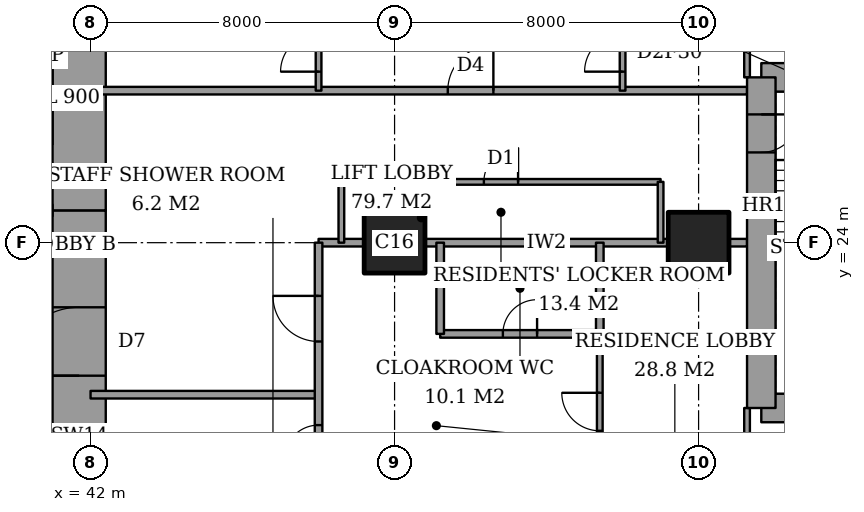
"""IFC4 building model, lengths in metres.
Left out: names, types, materials, properties, quantities, classifications, styles, units other than length and angle.
Written with IfcOpenShell. Run it as: python <this file> out.ifc"""

import sys

from ifc_helpers import new_model, si_unit, direction, frame, frame_2d, origin, origin_2d, place, context, subcontext, project, spatial, rectangle, extrude, element, fill, save


model = new_model("IFC4")
c1 = context("Model", 3, precision=1e-05, world=origin(), true_north=direction((0.0, 1.0)))
c2 = subcontext(c1, "Body", "Model", "MODEL_VIEW")
j1 = project(units=[si_unit("LENGTHUNIT", "METRE"), si_unit("PLANEANGLEUNIT", "RADIAN")], contexts=[c1])
p1 = place(None, origin())
s1 = spatial("IfcSite", under=j1, at=p1, CompositionType="ELEMENT")
p2 = place(p1, origin())
s2 = spatial("IfcBuilding", under=s1, at=p2, CompositionType="ELEMENT")
p3 = place(p2, frame((0.0, 0.0, 230.4)))
s3 = spatial("IfcBuildingStorey", under=s2, at=p3, CompositionType="ELEMENT", Elevation=230.4)
for number, where, z_axis, x_axis in (
    (1, (50.0, 24.0, 0.0), (0.0, 0.0, 1.0), (1.0, 0.0, 0.0)),
    (2, (58.0, 24.0, 0.0), (0.0, 0.0, 1.0), (1.0, 0.0, 0.0)),
):
    element("IfcColumn", number, at=place(p3, frame(where, z_axis=z_axis, x_axis=x_axis)), inside=s3, PredefinedType="COLUMN", context=c2, shape_type="SweptSolid", body=[
        extrude(rectangle(XDim=1.6, YDim=1.6, at=origin_2d()), origin(), (0.0, 0.0, 1.0), 3.6),
    ])
p4 = place(p3, frame((41.7, 13.0, 0.0), z_axis=(0.0, 0.0, 1.0), x_axis=(0.0, 1.0, 0.0)))
e3 = element("IfcWall", 3, at=p4, inside=s3, PredefinedType="SHEAR", context=c2, shape_type="SweptSolid", body=[
    extrude(rectangle(XDim=11.85, YDim=1.4, at=frame_2d((5.925, 0.0))), origin(), (0.0, 0.0, 1.0), 3.6),
])
p5 = place(p4, frame((7.5, 0.0, 0.0)))
e4 = element("IfcOpeningElement", 4, at=p5, cuts=e3, PredefinedType="OPENING", context=c2, shape_type="SweptSolid", body=[
    extrude(rectangle(XDim=1.8, YDim=2.4, at=frame_2d((0.9, 1.2))), frame((0.0, 0.71, 0.0), z_axis=(0.0, -1.0, 0.0), x_axis=(1.0, 0.0, 0.0)), (0.0, 0.0, 1.0), 1.42),
])
p6 = place(p3, frame((41.7, 24.85, 0.0), z_axis=(0.0, 0.0, 1.0), x_axis=(0.0, 1.0, 0.0)))
e5 = element("IfcWall", 5, at=p6, inside=s3, PredefinedType="SHEAR", context=c2, shape_type="SweptSolid", body=[
    extrude(rectangle(XDim=10.15, YDim=1.4, at=frame_2d((5.075, 0.0))), origin(), (0.0, 0.0, 1.0), 3.6),
])
for number, where, z_axis, x_axis in (
    (6, (59.65, 19.65, 0.0), (0.0, 0.0, 1.0), (1.0, 0.0, 0.0)),
    (7, (64.1, 28.35, 0.0), (0.0, 0.0, 1.0), (-1.0, 0.0, 0.0)),
):
    element("IfcWall", number, at=place(p3, frame(where, z_axis=z_axis, x_axis=x_axis)), inside=s3, PredefinedType="SHEAR", context=c2, shape_type="SweptSolid", body=[
        extrude(rectangle(XDim=4.45, YDim=0.75, at=frame_2d((2.225, 0.0))), origin(), (0.0, 0.0, 1.0), 3.6),
    ])
p7 = place(p3, frame((59.65, 28.35, 0.0), z_axis=(0.0, 0.0, 1.0), x_axis=(0.0, -1.0, 0.0)))
e8 = element("IfcWall", 8, at=p7, inside=s3, PredefinedType="SHEAR", context=c2, shape_type="SweptSolid", body=[
    extrude(rectangle(XDim=8.7, YDim=0.75, at=frame_2d((4.35, 0.0))), origin(), (0.0, 0.0, 1.0), 3.6),
])
p8 = place(p7, frame((0.975, 0.0, 0.0)))
e9 = element("IfcOpeningElement", 9, at=p8, cuts=e8, PredefinedType="OPENING", context=c2, shape_type="SweptSolid", body=[
    extrude(rectangle(XDim=1.0, YDim=2.1, at=frame_2d((0.5, 1.05))), frame((0.0, 0.385, 0.0), z_axis=(0.0, -1.0, 0.0), x_axis=(1.0, 0.0, 0.0)), (0.0, 0.0, 1.0), 0.77),
])
p9 = place(p3, frame((42.0, 20.0, 0.0), z_axis=(0.0, 0.0, 1.0), x_axis=(1.0, 0.0, 0.0)))
e10 = element("IfcWall", 10, at=p9, inside=s3, PredefinedType="PARTITIONING", context=c2, shape_type="SweptSolid", body=[
    extrude(rectangle(XDim=6.0, YDim=0.2, at=frame_2d((3.0, 0.0))), origin(), (0.0, 0.0, 1.0), 3.35),
])
p10 = place(p3, frame((51.2, 21.6, 0.0), z_axis=(0.0, 0.0, 1.0), x_axis=(1.0, 0.0, 0.0)))
e11 = element("IfcWall", 11, at=p10, inside=s3, PredefinedType="PARTITIONING", context=c2, shape_type="SweptSolid", body=[
    extrude(rectangle(XDim=4.2, YDim=0.2, at=frame_2d((2.1, 0.0))), origin(), (0.0, 0.0, 1.0), 3.35),
])
p11 = place(p10, frame((1.65, 0.0, 0.0)))
e12 = element("IfcOpeningElement", 12, at=p11, cuts=e11, PredefinedType="OPENING", context=c2, shape_type="SweptSolid", body=[
    extrude(rectangle(XDim=0.9, YDim=2.1, at=frame_2d((0.45, 1.05))), frame((0.0, 0.11, 0.0), z_axis=(0.0, -1.0, 0.0), x_axis=(1.0, 0.0, 0.0)), (0.0, 0.0, 1.0), 0.22),
])
p12 = place(p3, frame((48.0, 24.0, 0.0), z_axis=(0.0, 0.0, 1.0), x_axis=(1.0, 0.0, 0.0)))
e13 = element("IfcWall", 13, at=p12, inside=s3, PredefinedType="PARTITIONING", context=c2, shape_type="SweptSolid", body=[
    extrude(rectangle(XDim=1.2, YDim=0.2, at=frame_2d((0.6, 0.0))), origin(), (0.0, 0.0, 1.0), 3.35),
])
p13 = place(p3, frame((50.8, 24.0, 0.0), z_axis=(0.0, 0.0, 1.0), x_axis=(1.0, 0.0, 0.0)))
e14 = element("IfcWall", 14, at=p13, inside=s3, PredefinedType="PARTITIONING", context=c2, shape_type="SweptSolid", body=[
    extrude(rectangle(XDim=6.4, YDim=0.2, at=frame_2d((3.2, 0.0))), origin(), (0.0, 0.0, 1.0), 3.35),
])
p14 = place(p3, frame((58.8, 24.0, 0.0), z_axis=(0.0, 0.0, 1.0), x_axis=(1.0, 0.0, 0.0)))
e15 = element("IfcWall", 15, at=p14, inside=s3, PredefinedType="PARTITIONING", context=c2, shape_type="SweptSolid", body=[
    extrude(rectangle(XDim=0.475, YDim=0.2, at=frame_2d((0.237, 0.0))), origin(), (0.0, 0.0, 1.0), 3.35),
])
p15 = place(p3, frame((48.6, 25.6, 0.0), z_axis=(0.0, 0.0, 1.0), x_axis=(1.0, 0.0, 0.0)))
e16 = element("IfcWall", 16, at=p15, inside=s3, PredefinedType="PARTITIONING", context=c2, shape_type="SweptSolid", body=[
    extrude(rectangle(XDim=8.4, YDim=0.15, at=frame_2d((4.2, 0.0))), origin(), (0.0, 0.0, 1.0), 3.35),
])
p16 = place(p15, frame((3.75, 0.0, 0.0)))
e17 = element("IfcOpeningElement", 17, at=p16, cuts=e16, PredefinedType="OPENING", context=c2, shape_type="SweptSolid", body=[
    extrude(rectangle(XDim=0.9, YDim=2.1, at=frame_2d((0.45, 1.05))), frame((0.0, 0.085, 0.0), z_axis=(0.0, -1.0, 0.0), x_axis=(1.0, 0.0, 0.0)), (0.0, 0.0, 1.0), 0.17),
])
p17 = place(p3, frame((42.0, 28.0, 0.0), z_axis=(0.0, 0.0, 1.0), x_axis=(1.0, 0.0, 0.0)))
e18 = element("IfcWall", 18, at=p17, inside=s3, PredefinedType="PARTITIONING", context=c2, shape_type="SweptSolid", body=[
    extrude(rectangle(XDim=17.275, YDim=0.2, at=frame_2d((8.637, 0.0))), origin(), (0.0, 0.0, 1.0), 3.35),
])
p18 = place(p17, frame((9.4, 0.0, 0.0)))
e19 = element("IfcOpeningElement", 19, at=p18, cuts=e18, PredefinedType="OPENING", context=c2, shape_type="SweptSolid", body=[
    extrude(rectangle(XDim=1.2, YDim=2.4, at=frame_2d((0.6, 1.2))), frame((0.0, 0.11, 0.0), z_axis=(0.0, -1.0, 0.0), x_axis=(1.0, 0.0, 0.0)), (0.0, 0.0, 1.0), 0.22),
])
p19 = place(p3, frame((48.0, 17.5, 0.0), z_axis=(0.0, 0.0, 1.0), x_axis=(0.0, 1.0, 0.0)))
e20 = element("IfcWall", 20, at=p19, inside=s3, PredefinedType="PARTITIONING", context=c2, shape_type="SweptSolid", body=[
    extrude(rectangle(XDim=6.5, YDim=0.2, at=frame_2d((3.25, 0.0))), origin(), (0.0, 0.0, 1.0), 3.35),
])
p20 = place(p19, frame((3.9, 0.0, 0.0)))
e21 = element("IfcOpeningElement", 21, at=p20, cuts=e20, PredefinedType="OPENING", context=c2, shape_type="SweptSolid", body=[
    extrude(rectangle(XDim=1.2, YDim=2.4, at=frame_2d((0.6, 1.2))), frame((0.0, 0.11, 0.0), z_axis=(0.0, -1.0, 0.0), x_axis=(1.0, 0.0, 0.0)), (0.0, 0.0, 1.0), 0.22),
])
p21 = place(p19, frame((0.8, 0.0, 0.0)))
e22 = element("IfcOpeningElement", 22, at=p21, cuts=e20, PredefinedType="OPENING", context=c2, shape_type="SweptSolid", body=[
    extrude(rectangle(XDim=0.9, YDim=2.1, at=frame_2d((0.45, 1.05))), frame((0.0, 0.11, 0.0), z_axis=(0.0, -1.0, 0.0), x_axis=(1.0, 0.0, 0.0)), (0.0, 0.0, 1.0), 0.22),
])
p22 = place(p3, frame((48.0, 28.0, 0.0), z_axis=(0.0, 0.0, 1.0), x_axis=(0.0, 1.0, 0.0)))
e23 = element("IfcWall", 23, at=p22, inside=s3, PredefinedType="PARTITIONING", context=c2, shape_type="SweptSolid", body=[
    extrude(rectangle(XDim=9.4, YDim=0.15, at=frame_2d((4.7, 0.0))), origin(), (0.0, 0.0, 1.0), 3.35),
])
p23 = place(p22, frame((0.5, 0.0, 0.0)))
e24 = element("IfcOpeningElement", 24, at=p23, cuts=e23, PredefinedType="OPENING", context=c2, shape_type="SweptSolid", body=[
    extrude(rectangle(XDim=1.0, YDim=2.1, at=frame_2d((0.5, 1.05))), frame((0.0, 0.085, 0.0), z_axis=(0.0, -1.0, 0.0), x_axis=(1.0, 0.0, 0.0)), (0.0, 0.0, 1.0), 0.17),
])
p24 = place(p3, frame((48.6, 24.0, 0.0), z_axis=(0.0, 0.0, 1.0), x_axis=(0.0, 1.0, 0.0)))
e25 = element("IfcWall", 25, at=p24, inside=s3, PredefinedType="PARTITIONING", context=c2, shape_type="SweptSolid", body=[
    extrude(rectangle(XDim=1.6, YDim=0.15, at=frame_2d((0.8, 0.0))), origin(), (0.0, 0.0, 1.0), 3.35),
])
for number, where, z_axis, x_axis in (
    (26, (51.2, 21.6, 0.0), (0.0, 0.0, 1.0), (0.0, 1.0, 0.0)),
    (27, (55.4, 21.6, 0.0), (0.0, 0.0, 1.0), (0.0, 1.0, 0.0)),
):
    element("IfcWall", number, at=place(p3, frame(where, z_axis=z_axis, x_axis=x_axis)), inside=s3, PredefinedType="PARTITIONING", context=c2, shape_type="SweptSolid", body=[
        extrude(rectangle(XDim=2.4, YDim=0.2, at=frame_2d((1.2, 0.0))), origin(), (0.0, 0.0, 1.0), 3.35),
    ])
p25 = place(p3, frame((55.4, 11.0, 0.0), z_axis=(0.0, 0.0, 1.0), x_axis=(0.0, 1.0, 0.0)))
e28 = element("IfcWall", 28, at=p25, inside=s3, PredefinedType="PARTITIONING", context=c2, shape_type="SweptSolid", body=[
    extrude(rectangle(XDim=10.6, YDim=0.15, at=frame_2d((5.3, 0.0))), origin(), (0.0, 0.0, 1.0), 3.35),
])
p26 = place(p25, frame((8.05, 0.0, 0.0)))
e29 = element("IfcOpeningElement", 29, at=p26, cuts=e28, PredefinedType="OPENING", context=c2, shape_type="SweptSolid", body=[
    extrude(rectangle(XDim=1.0, YDim=2.1, at=frame_2d((0.5, 1.05))), frame((0.0, 0.085, 0.0), z_axis=(0.0, -1.0, 0.0), x_axis=(1.0, 0.0, 0.0)), (0.0, 0.0, 1.0), 0.17),
])
p27 = place(p3, frame((56.0, 28.0, 0.0), z_axis=(0.0, 0.0, 1.0), x_axis=(0.0, 1.0, 0.0)))
e30 = element("IfcWall", 30, at=p27, inside=s3, PredefinedType="PARTITIONING", context=c2, shape_type="SweptSolid", body=[
    extrude(rectangle(XDim=9.4, YDim=0.15, at=frame_2d((4.7, 0.0))), origin(), (0.0, 0.0, 1.0), 3.35),
])
p28 = place(p27, frame((0.5, 0.0, 0.0)))
e31 = element("IfcOpeningElement", 31, at=p28, cuts=e30, PredefinedType="OPENING", context=c2, shape_type="SweptSolid", body=[
    extrude(rectangle(XDim=1.0, YDim=2.1, at=frame_2d((0.5, 1.05))), frame((0.0, 0.085, 0.0), z_axis=(0.0, -1.0, 0.0), x_axis=(1.0, 0.0, 0.0)), (0.0, 0.0, 1.0), 0.17),
])
p29 = place(p3, frame((57.0, 24.0, 0.0), z_axis=(0.0, 0.0, 1.0), x_axis=(0.0, 1.0, 0.0)))
e32 = element("IfcWall", 32, at=p29, inside=s3, PredefinedType="PARTITIONING", context=c2, shape_type="SweptSolid", body=[
    extrude(rectangle(XDim=1.6, YDim=0.15, at=frame_2d((0.8, 0.0))), origin(), (0.0, 0.0, 1.0), 3.35),
])
p30 = place(p3, frame((59.275, 17.2, 0.0), z_axis=(0.0, 0.0, 1.0), x_axis=(0.0, 1.0, 0.0)))
e33 = element("IfcWall", 33, at=p30, inside=s3, PredefinedType="PARTITIONING", context=c2, shape_type="SweptSolid", body=[
    extrude(rectangle(XDim=2.45, YDim=0.15, at=frame_2d((1.225, 0.0))), origin(), (0.0, 0.0, 1.0), 3.35),
])
p31 = place(p30, frame((0.587, 0.0, 0.0)))
e34 = element("IfcOpeningElement", 34, at=p31, cuts=e33, PredefinedType="OPENING", context=c2, shape_type="SweptSolid", body=[
    extrude(rectangle(XDim=0.9, YDim=2.1, at=frame_2d((0.45, 1.05))), frame((0.0, 0.085, 0.0), z_axis=(0.0, -1.0, 0.0), x_axis=(1.0, 0.0, 0.0)), (0.0, 0.0, 1.0), 0.17),
])
p32 = place(p3, frame((59.275, 28.35, 0.0), z_axis=(0.0, 0.0, 1.0), x_axis=(0.0, 1.0, 0.0)))
e35 = element("IfcWall", 35, at=p32, inside=s3, PredefinedType="PARTITIONING", context=c2, shape_type="SweptSolid", body=[
    extrude(rectangle(XDim=2.45, YDim=0.15, at=frame_2d((1.225, 0.0))), origin(), (0.0, 0.0, 1.0), 3.35),
])
p33 = place(p32, frame((0.962, 0.0, 0.0)))
e36 = element("IfcOpeningElement", 36, at=p33, cuts=e35, PredefinedType="OPENING", context=c2, shape_type="SweptSolid", body=[
    extrude(rectangle(XDim=0.9, YDim=2.1, at=frame_2d((0.45, 1.05))), frame((0.0, 0.085, 0.0), z_axis=(0.0, -1.0, 0.0), x_axis=(1.0, 0.0, 0.0)), (0.0, 0.0, 1.0), 0.17),
])
p34 = place(p26, origin())
e37 = element("IfcDoor", 37, at=p34, inside=s3, OperationType="SINGLE_SWING_LEFT", PredefinedType="DOOR", context=c2, shape_type="SweptSolid", body=[
    extrude(rectangle(XDim=1.0, YDim=2.1, at=frame_2d((0.5, 1.05))), frame((0.0, 0.025, 0.0), z_axis=(0.0, -1.0, 0.0), x_axis=(1.0, 0.0, 0.0)), (0.0, 0.0, 1.0), 0.05),
])
fill(e29, e37)
p35 = place(p11, origin())
e38 = element("IfcDoor", 38, at=p35, inside=s3, OperationType="SINGLE_SWING_LEFT", PredefinedType="DOOR", context=c2, shape_type="SweptSolid", body=[
    extrude(rectangle(XDim=0.9, YDim=2.1, at=frame_2d((0.45, 1.05))), frame((0.0, 0.025, 0.0), z_axis=(0.0, -1.0, 0.0), x_axis=(1.0, 0.0, 0.0)), (0.0, 0.0, 1.0), 0.05),
])
fill(e12, e38)
p36 = place(p20, origin())
e39 = element("IfcDoor", 39, at=p36, inside=s3, OperationType="SINGLE_SWING_LEFT", PredefinedType="DOOR", context=c2, shape_type="SweptSolid", body=[
    extrude(rectangle(XDim=1.2, YDim=2.4, at=frame_2d((0.6, 1.2))), frame((0.0, 0.025, 0.0), z_axis=(0.0, -1.0, 0.0), x_axis=(1.0, 0.0, 0.0)), (0.0, 0.0, 1.0), 0.05),
])
fill(e21, e39)
p37 = place(p21, origin())
e40 = element("IfcDoor", 40, at=p37, inside=s3, OperationType="SINGLE_SWING_RIGHT", PredefinedType="DOOR", context=c2, shape_type="SweptSolid", body=[
    extrude(rectangle(XDim=0.9, YDim=2.1, at=frame_2d((0.45, 1.05))), frame((0.0, 0.025, 0.0), z_axis=(0.0, -1.0, 0.0), x_axis=(1.0, 0.0, 0.0)), (0.0, 0.0, 1.0), 0.05),
])
fill(e22, e40)
p38 = place(p28, origin())
e41 = element("IfcDoor", 41, at=p38, inside=s3, OperationType="SINGLE_SWING_RIGHT", PredefinedType="DOOR", context=c2, shape_type="SweptSolid", body=[
    extrude(rectangle(XDim=1.0, YDim=2.1, at=frame_2d((0.5, 1.05))), frame((0.0, 0.025, 0.0), z_axis=(0.0, -1.0, 0.0), x_axis=(1.0, 0.0, 0.0)), (0.0, 0.0, 1.0), 0.05),
])
fill(e31, e41)
p39 = place(p18, origin())
e42 = element("IfcDoor", 42, at=p39, inside=s3, OperationType="SINGLE_SWING_LEFT", PredefinedType="DOOR", context=c2, shape_type="SweptSolid", body=[
    extrude(rectangle(XDim=1.2, YDim=2.4, at=frame_2d((0.6, 1.2))), frame((0.0, 0.025, 0.0), z_axis=(0.0, -1.0, 0.0), x_axis=(1.0, 0.0, 0.0)), (0.0, 0.0, 1.0), 0.05),
])
fill(e19, e42)
p40 = place(p23, origin())
e43 = element("IfcDoor", 43, at=p40, inside=s3, OperationType="SINGLE_SWING_RIGHT", PredefinedType="DOOR", context=c2, shape_type="SweptSolid", body=[
    extrude(rectangle(XDim=1.0, YDim=2.1, at=frame_2d((0.5, 1.05))), frame((0.0, 0.025, 0.0), z_axis=(0.0, -1.0, 0.0), x_axis=(1.0, 0.0, 0.0)), (0.0, 0.0, 1.0), 0.05),
])
fill(e24, e43)
p41 = place(p16, origin())
e44 = element("IfcDoor", 44, at=p41, inside=s3, OperationType="SINGLE_SWING_LEFT", PredefinedType="DOOR", context=c2, shape_type="SweptSolid", body=[
    extrude(rectangle(XDim=0.9, YDim=2.1, at=frame_2d((0.45, 1.05))), frame((0.0, 0.025, 0.0), z_axis=(0.0, -1.0, 0.0), x_axis=(1.0, 0.0, 0.0)), (0.0, 0.0, 1.0), 0.05),
])
fill(e17, e44)
p42 = place(p5, origin())
e45 = element("IfcDoor", 45, at=p42, inside=s3, OperationType="DOUBLE_DOOR_DOUBLE_SWING", PredefinedType="DOOR", context=c2, shape_type="SweptSolid", body=[
    extrude(rectangle(XDim=1.8, YDim=2.4, at=frame_2d((0.9, 1.2))), frame((0.0, 0.025, 0.0), z_axis=(0.0, -1.0, 0.0), x_axis=(1.0, 0.0, 0.0)), (0.0, 0.0, 1.0), 0.05),
])
fill(e4, e45)
p43 = place(p8, origin())
e46 = element("IfcDoor", 46, at=p43, inside=s3, OperationType="SINGLE_SWING_RIGHT", PredefinedType="DOOR", context=c2, shape_type="SweptSolid", body=[
    extrude(rectangle(XDim=1.0, YDim=2.1, at=frame_2d((0.5, 1.05))), frame((0.0, 0.025, 0.0), z_axis=(0.0, -1.0, 0.0), x_axis=(1.0, 0.0, 0.0)), (0.0, 0.0, 1.0), 0.05),
])
fill(e9, e46)
save(model, sys.argv[1])
